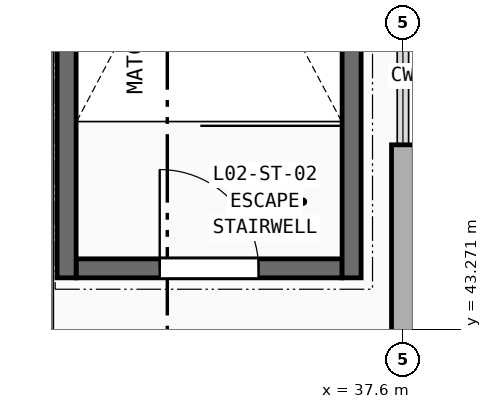
"""IFC4 building model, lengths in metres.
Left out: names, types, materials, properties, quantities, classifications, styles, units other than length and angle.
Written with IfcOpenShell. Run it as: python <this file> out.ifc"""

import sys

from ifc_helpers import new_model, si_unit, direction, frame, frame_2d, origin, place, context, subcontext, project, spatial, rectangle, extrude, element, fill, save


model = new_model("IFC4")
c1 = context("Model", 3, precision=1e-05, world=origin(), true_north=direction((0.0, 1.0)))
c2 = subcontext(c1, "Body", "Model", "MODEL_VIEW")
j1 = project(units=[si_unit("LENGTHUNIT", "METRE"), si_unit("PLANEANGLEUNIT", "RADIAN")], contexts=[c1])
p1 = place(None, origin())
s1 = spatial("IfcSite", under=j1, at=p1, CompositionType="ELEMENT")
p2 = place(p1, origin())
s2 = spatial("IfcBuilding", under=s1, at=p2, CompositionType="ELEMENT")
p3 = place(p2, frame((0.0, 0.0, 9.6)))
s3 = spatial("IfcBuildingStorey", under=s2, at=p3, CompositionType="ELEMENT", Elevation=9.6)
p4 = place(p3, frame((37.6, 42.4, 0.0), z_axis=(0.0, 0.0, 1.0), x_axis=(0.0, 1.0, 0.0)))
e1 = element("IfcWall", 1, at=p4, inside=s3, PredefinedType="SOLIDWALL", context=c2, shape_type="SweptSolid", body=[
    extrude(rectangle(XDim=3.3, YDim=0.3, at=frame_2d((1.65, 0.0))), origin(), (0.0, 0.0, 1.0), 3.31),
])
p5 = place(p3, frame((33.3, 44.075, 0.0), z_axis=(0.0, 0.0, 1.0), x_axis=(1.0, 0.0, 0.0)))
e2 = element("IfcWall", 2, at=p5, inside=s3, PredefinedType="SHEAR", context=c2, shape_type="SweptSolid", body=[
    extrude(rectangle(XDim=3.5, YDim=0.25, at=frame_2d((1.75, 0.0))), origin(), (0.0, 0.0, 1.0), 4.2),
])
p6 = place(p5, frame((1.1, 0.0, -0.01)))
e3 = element("IfcOpeningElement", 3, at=p6, cuts=e2, PredefinedType="OPENING", context=c2, shape_type="SweptSolid", body=[
    extrude(rectangle(XDim=1.3, YDim=2.16, at=frame_2d((0.65, 1.08))), frame((0.0, 0.135, 0.0), z_axis=(0.0, -1.0, 0.0), x_axis=(1.0, 0.0, 0.0)), (0.0, 0.0, 1.0), 0.27),
])
for number, where, z_axis, x_axis in (
    (4, (33.175, 43.95, 0.0), (0.0, 0.0, 1.0), (0.0, 1.0, 0.0)),
    (5, (36.925, 43.95, 0.0), (0.0, 0.0, 1.0), (0.0, 1.0, 0.0)),
):
    element("IfcWall", number, at=place(p3, frame(where, z_axis=z_axis, x_axis=x_axis)), inside=s3, PredefinedType="SHEAR", context=c2, shape_type="SweptSolid", body=[
        extrude(rectangle(XDim=8.9, YDim=0.25, at=frame_2d((4.45, 0.0))), origin(), (0.0, 0.0, 1.0), 4.2),
    ])
p7 = place(p6, frame((1.3, 0.0, 0.01), z_axis=(0.0, 0.0, 1.0), x_axis=(-1.0, 0.0, 0.0)))
e6 = element("IfcDoor", 6, at=p7, inside=s3, OperationType="SINGLE_SWING_LEFT", PredefinedType="DOOR", context=c2, shape_type="SweptSolid", body=[
    extrude(rectangle(XDim=1.3, YDim=2.15, at=frame_2d((0.65, 1.075))), frame((0.0, 0.025, 0.0), z_axis=(0.0, -1.0, 0.0), x_axis=(1.0, 0.0, 0.0)), (0.0, 0.0, 1.0), 0.05),
])
fill(e3, e6)
save(model, sys.argv[1])
